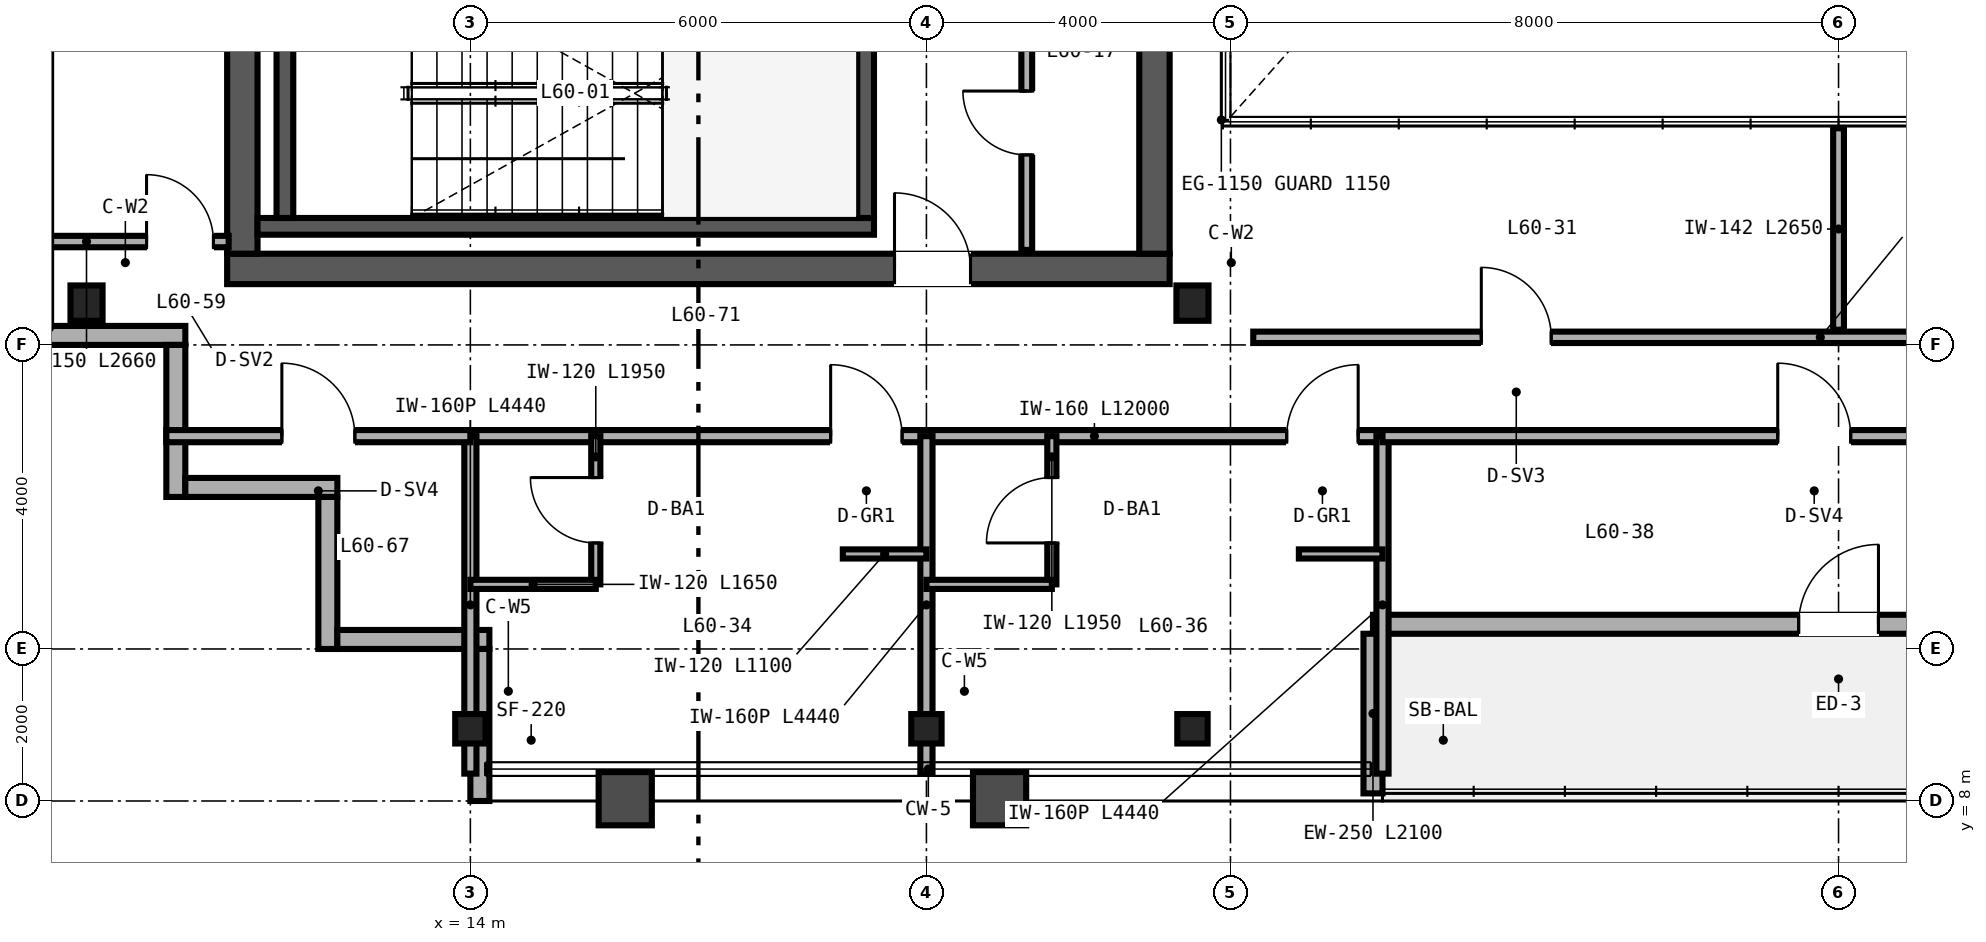
"""IFC4 building model, lengths in metres.
Left out: names, types, materials, properties, quantities, classifications, styles, units other than length and angle.
Written with IfcOpenShell. Run it as: python <this file> out.ifc"""

import sys

from ifc_helpers import new_model, si_unit, direction, frame, frame_2d, origin, origin_2d, place, context, subcontext, project, spatial, rectangle, i_section, extrude, source, transform, mapped, element, fill, save


model = new_model("IFC4")
c1 = context("Model", 3, precision=1e-05, world=origin(), true_north=direction((0.0, 1.0)))
c2 = subcontext(c1, "Body", "Model", "MODEL_VIEW")
j1 = project(units=[si_unit("LENGTHUNIT", "METRE"), si_unit("PLANEANGLEUNIT", "RADIAN")], contexts=[c1])
p1 = place(None, origin())
s1 = spatial("IfcSite", under=j1, at=p1, CompositionType="ELEMENT")
p2 = place(p1, origin())
s2 = spatial("IfcBuilding", under=s1, at=p2, CompositionType="ELEMENT")
p3 = place(p2, frame((0.0, 0.0, 240.0)))
s3 = spatial("IfcBuildingStorey", under=s2, at=p3, CompositionType="ELEMENT", Elevation=240.0)
p4 = place(p3, frame((10.8, 15.0, 0.0), z_axis=(0.0, 0.0, 1.0), x_axis=(1.0, 0.0, 0.0)))
e1 = element("IfcWall", 1, at=p4, inside=s3, PredefinedType="SHEAR", context=c2, shape_type="SweptSolid", body=[
    extrude(rectangle(XDim=12.4, YDim=0.4, at=frame_2d((6.2, 0.0))), origin(), (0.0, 0.0, 1.0), 3.38),
])
p5 = place(p4, frame((8.78, 0.0, 0.0)))
e2 = element("IfcOpeningElement", 2, at=p5, cuts=e1, PredefinedType="OPENING", context=c2, shape_type="SweptSolid", body=[
    extrude(rectangle(XDim=1.0, YDim=2.15, at=frame_2d((0.5, 1.075))), frame((0.0, 0.21, 0.0), z_axis=(0.0, -1.0, 0.0), x_axis=(1.0, 0.0, 0.0)), (0.0, 0.0, 1.0), 0.42),
])
for number, where, z_axis, x_axis in (
    (3, (11.0, 15.2, 0.0), (0.0, 0.0, 1.0), (0.0, 1.0, 0.0)),
    (4, (23.0, 15.2, 0.0), (0.0, 0.0, 1.0), (0.0, 1.0, 0.0)),
):
    element("IfcWall", number, at=place(p3, frame(where, z_axis=z_axis, x_axis=x_axis)), inside=s3, PredefinedType="SHEAR", context=c2, shape_type="SweptSolid", body=[
        extrude(rectangle(XDim=21.6, YDim=0.4, at=frame_2d((10.8, 0.0))), origin(), (0.0, 0.0, 1.0), 3.38),
    ])
p6 = place(p3, frame((11.2, 15.56, 0.0), z_axis=(0.0, 0.0, 1.0), x_axis=(1.0, 0.0, 0.0)))
e5 = element("IfcWall", 5, at=p6, inside=s3, PredefinedType="SHEAR", context=c2, shape_type="SweptSolid", body=[
    extrude(rectangle(XDim=8.11, YDim=0.22, at=frame_2d((4.055, 0.0))), origin(), (0.0, 0.0, 1.0), 3.4),
])
for number, where, z_axis, x_axis in (
    (6, (11.56, 15.67, 0.0), (0.0, 0.0, 1.0), (0.0, 1.0, 0.0)),
    (7, (19.2, 15.67, 0.0), (0.0, 0.0, 1.0), (0.0, 1.0, 0.0)),
):
    element("IfcWall", number, at=place(p3, frame(where, z_axis=z_axis, x_axis=x_axis)), inside=s3, PredefinedType="SHEAR", context=c2, shape_type="SweptSolid", body=[
        extrude(rectangle(XDim=3.28, YDim=0.22, at=frame_2d((1.64, 0.0))), origin(), (0.0, 0.0, 1.0), 3.4),
    ])
m1 = source(origin(), c2, "Body", "SweptSolid", [
    extrude(i_section(OverallWidth=0.422, OverallDepth=0.465, WebThickness=0.045, FlangeThickness=0.073, FilletRadius=0.025, at=origin_2d()), origin(), (0.0, 0.0, 1.0), 3.38),
])
for number, where, z_axis, x_axis in (
    (8, (8.95, 14.55, 0.0), (0.0, 0.0, 1.0), (1.0, 0.0, 0.0)),
    (9, (23.5, 14.55, 0.0), (0.0, 0.0, 1.0), (1.0, 0.0, 0.0)),
):
    element("IfcColumn", number, at=place(p3, frame(where, z_axis=z_axis, x_axis=x_axis)), inside=s3, PredefinedType="COLUMN", context=c2, shape_type="MappedRepresentation", body=[
        mapped(m1, transform((0.0, 0.0, 0.0), scale=1.0)),
    ])
m2 = source(origin(), c2, "Body", "SweptSolid", [
    extrude(i_section(OverallWidth=0.399, OverallDepth=0.387, WebThickness=0.021, FlangeThickness=0.033, FilletRadius=0.025, at=origin_2d()), origin(), (0.0, 0.0, 1.0), 3.38),
])
for number, where, z_axis, x_axis in (
    (10, (14.0, 8.95, 0.0), (0.0, 0.0, 1.0), (1.0, 0.0, 0.0)),
    (11, (20.0, 8.95, 0.0), (0.0, 0.0, 1.0), (1.0, 0.0, 0.0)),
    (12, (23.5, 8.95, 0.0), (0.0, 0.0, 1.0), (1.0, 0.0, 0.0)),
):
    element("IfcColumn", number, at=place(p3, frame(where, z_axis=z_axis, x_axis=x_axis)), inside=s3, PredefinedType="COLUMN", context=c2, shape_type="MappedRepresentation", body=[
        mapped(m2, transform((0.0, 0.0, 0.0), scale=1.0)),
    ])
p7 = place(p3, frame((8.0, 14.125, 0.0), z_axis=(0.0, 0.0, 1.0), x_axis=(1.0, 0.0, 0.0)))
e13 = element("IfcWall", 13, at=p7, inside=s3, PredefinedType="SOLIDWALL", context=c2, shape_type="SweptSolid", body=[
    extrude(rectangle(XDim=2.25, YDim=0.25, at=frame_2d((1.125, 0.0))), origin(), (0.0, 0.0, 1.0), 3.38),
])
for number, where, z_axis, x_axis in (
    (14, (10.125, 14.0, 0.0), (0.0, 0.0, 1.0), (0.0, -1.0, 0.0)),
    (15, (10.25, 12.125, 0.0), (0.0, 0.0, 1.0), (1.0, 0.0, 0.0)),
    (16, (12.125, 12.0, 0.0), (0.0, 0.0, 1.0), (0.0, -1.0, 0.0)),
    (17, (12.25, 10.125, 0.0), (0.0, 0.0, 1.0), (1.0, 0.0, 0.0)),
):
    element("IfcWall", number, at=place(p3, frame(where, z_axis=z_axis, x_axis=x_axis)), inside=s3, PredefinedType="SOLIDWALL", context=c2, shape_type="SweptSolid", body=[
        extrude(rectangle(XDim=2.0, YDim=0.25, at=frame_2d((1.0, 0.0))), origin(), (0.0, 0.0, 1.0), 3.38),
    ])
p8 = place(p3, frame((14.125, 10.0, 0.0), z_axis=(0.0, 0.0, 1.0), x_axis=(0.0, -1.0, 0.0)))
e18 = element("IfcWall", 18, at=p8, inside=s3, PredefinedType="SOLIDWALL", context=c2, shape_type="SweptSolid", body=[
    extrude(rectangle(XDim=2.0, YDim=0.25, at=frame_2d((1.0, 0.0))), origin(), (0.0, 0.0, 1.0), 2.687),
])
p9 = place(p3, frame((25.875, 10.325, 0.0), z_axis=(0.0, 0.0, 1.0), x_axis=(1.0, 0.0, 0.0)))
e19 = element("IfcWall", 19, at=p9, inside=s3, PredefinedType="SOLIDWALL", context=c2, shape_type="SweptSolid", body=[
    extrude(rectangle(XDim=12.25, YDim=0.25, at=frame_2d((6.125, 0.0))), origin(), (0.0, 0.0, 1.0), 3.38),
])
p10 = place(p9, frame((5.6, 0.0, 0.0)))
e20 = element("IfcOpeningElement", 20, at=p10, cuts=e19, PredefinedType="OPENING", context=c2, shape_type="SweptSolid", body=[
    extrude(rectangle(XDim=1.05, YDim=2.15, at=frame_2d((0.525, 1.075))), frame((0.0, 0.135, 0.0), z_axis=(0.0, -1.0, 0.0), x_axis=(1.0, 0.0, 0.0)), (0.0, 0.0, 1.0), 0.27),
])
p11 = place(p3, frame((25.875, 8.1, 0.0), z_axis=(0.0, 0.0, 1.0), x_axis=(0.0, 1.0, 0.0)))
e21 = element("IfcWall", 21, at=p11, inside=s3, PredefinedType="SOLIDWALL", context=c2, shape_type="SweptSolid", body=[
    extrude(rectangle(XDim=2.1, YDim=0.25, at=frame_2d((1.05, 0.0))), origin(), (0.0, 0.0, 1.0), 2.453),
])
p12 = place(p3, frame((21.32, 15.25, 0.0), z_axis=(0.0, 0.0, 1.0), x_axis=(0.0, 1.0, 0.0)))
e22 = element("IfcWall", 22, at=p12, inside=s3, PredefinedType="PARTITIONING", context=c2, shape_type="SweptSolid", body=[
    extrude(rectangle(XDim=3.59, YDim=0.142, at=frame_2d((1.795, 0.0))), origin(), (0.0, 0.0, 1.0), 3.38),
])
p13 = place(p12, frame((1.25, 0.0, 0.0)))
e23 = element("IfcOpeningElement", 23, at=p13, cuts=e22, PredefinedType="OPENING", context=c2, shape_type="SweptSolid", body=[
    extrude(rectangle(XDim=0.84, YDim=2.1, at=frame_2d((0.42, 1.05))), frame((0.0, 0.081, 0.0), z_axis=(0.0, -1.0, 0.0), x_axis=(1.0, 0.0, 0.0)), (0.0, 0.0, 1.0), 0.162),
])
p14 = place(p3, frame((32.0, 14.2, 0.0), z_axis=(0.0, 0.0, 1.0), x_axis=(0.0, 1.0, 0.0)))
e24 = element("IfcWall", 24, at=p14, inside=s3, PredefinedType="PARTITIONING", context=c2, shape_type="SweptSolid", body=[
    extrude(rectangle(XDim=2.65, YDim=0.142, at=frame_2d((1.325, 0.0))), origin(), (0.0, 0.0, 1.0), 3.38),
])
p15 = place(p3, frame((24.3, 14.1, 0.0), z_axis=(0.0, 0.0, 1.0), x_axis=(1.0, 0.0, 0.0)))
e25 = element("IfcWall", 25, at=p15, inside=s3, PredefinedType="PARTITIONING", context=c2, shape_type="SweptSolid", body=[
    extrude(rectangle(XDim=15.4, YDim=0.15, at=frame_2d((7.7, 0.0))), origin(), (0.0, 0.0, 1.0), 3.38),
])
p16 = place(p15, frame((3.0, 0.0, 0.0)))
e26 = element("IfcOpeningElement", 26, at=p16, cuts=e25, PredefinedType="OPENING", context=c2, shape_type="SweptSolid", body=[
    extrude(rectangle(XDim=0.92, YDim=2.15, at=frame_2d((0.46, 1.075))), frame((0.0, 0.085, 0.0), z_axis=(0.0, -1.0, 0.0), x_axis=(1.0, 0.0, 0.0)), (0.0, 0.0, 1.0), 0.17),
])
p17 = place(p15, frame((11.0, 0.0, 0.0)))
e27 = element("IfcOpeningElement", 27, at=p17, cuts=e25, PredefinedType="OPENING", context=c2, shape_type="SweptSolid", body=[
    extrude(rectangle(XDim=0.92, YDim=2.15, at=frame_2d((0.46, 1.075))), frame((0.0, 0.085, 0.0), z_axis=(0.0, -1.0, 0.0), x_axis=(1.0, 0.0, 0.0)), (0.0, 0.0, 1.0), 0.17),
])
p18 = place(p3, frame((14.0, 12.8, 0.0), z_axis=(0.0, 0.0, 1.0), x_axis=(1.0, 0.0, 0.0)))
e28 = element("IfcWall", 28, at=p18, inside=s3, PredefinedType="PARTITIONING", context=c2, shape_type="SweptSolid", body=[
    extrude(rectangle(XDim=12.0, YDim=0.16, at=frame_2d((6.0, 0.0))), origin(), (0.0, 0.0, 1.0), 2.923),
])
p19 = place(p18, frame((4.74, 0.0, 0.0)))
e29 = element("IfcOpeningElement", 29, at=p19, cuts=e28, PredefinedType="OPENING", context=c2, shape_type="SweptSolid", body=[
    extrude(rectangle(XDim=0.94, YDim=2.15, at=frame_2d((0.47, 1.075))), frame((0.0, 0.09, 0.0), z_axis=(0.0, -1.0, 0.0), x_axis=(1.0, 0.0, 0.0)), (0.0, 0.0, 1.0), 0.18),
])
p20 = place(p18, frame((10.74, 0.0, 0.0)))
e30 = element("IfcOpeningElement", 30, at=p20, cuts=e28, PredefinedType="OPENING", context=c2, shape_type="SweptSolid", body=[
    extrude(rectangle(XDim=0.94, YDim=2.15, at=frame_2d((0.47, 1.075))), frame((0.0, 0.09, 0.0), z_axis=(0.0, -1.0, 0.0), x_axis=(1.0, 0.0, 0.0)), (0.0, 0.0, 1.0), 0.18),
])
p21 = place(p3, frame((14.0, 8.36, 0.0), z_axis=(0.0, 0.0, 1.0), x_axis=(0.0, 1.0, 0.0)))
e31 = element("IfcWall", 31, at=p21, inside=s3, PredefinedType="PARTITIONING", context=c2, shape_type="SweptSolid", body=[
    extrude(rectangle(XDim=4.44, YDim=0.16, at=frame_2d((2.22, 0.0))), origin(), (0.0, 0.0, 1.0), 2.687),
])
p22 = place(p3, frame((26.0, 8.36, 0.0), z_axis=(0.0, 0.0, 1.0), x_axis=(0.0, 1.0, 0.0)))
e32 = element("IfcWall", 32, at=p22, inside=s3, PredefinedType="PARTITIONING", context=c2, shape_type="SweptSolid", body=[
    extrude(rectangle(XDim=4.44, YDim=0.16, at=frame_2d((2.22, 0.0))), origin(), (0.0, 0.0, 1.0), 2.453),
])
p23 = place(p3, frame((20.0, 8.36, 0.0), z_axis=(0.0, 0.0, 1.0), x_axis=(0.0, 1.0, 0.0)))
e33 = element("IfcWall", 33, at=p23, inside=s3, PredefinedType="PARTITIONING", context=c2, shape_type="SweptSolid", body=[
    extrude(rectangle(XDim=4.44, YDim=0.16, at=frame_2d((2.22, 0.0))), origin(), (0.0, 0.0, 1.0), 2.687),
])
p24 = place(p3, frame((15.65, 10.85, 0.0), z_axis=(0.0, 0.0, 1.0), x_axis=(0.0, 1.0, 0.0)))
e34 = element("IfcWall", 34, at=p24, inside=s3, PredefinedType="PARTITIONING", context=c2, shape_type="SweptSolid", body=[
    extrude(rectangle(XDim=1.95, YDim=0.12, at=frame_2d((0.975, 0.0))), origin(), (0.0, 0.0, 1.0), 3.38),
])
p25 = place(p24, frame((0.545, 0.0, 0.0)))
e35 = element("IfcOpeningElement", 35, at=p25, cuts=e34, PredefinedType="OPENING", context=c2, shape_type="SweptSolid", body=[
    extrude(rectangle(XDim=0.86, YDim=2.1, at=frame_2d((0.43, 1.05))), frame((0.0, 0.07, 0.0), z_axis=(0.0, -1.0, 0.0), x_axis=(1.0, 0.0, 0.0)), (0.0, 0.0, 1.0), 0.14),
])
p26 = place(p3, frame((14.0, 10.85, 0.0), z_axis=(0.0, 0.0, 1.0), x_axis=(1.0, 0.0, 0.0)))
e36 = element("IfcWall", 36, at=p26, inside=s3, PredefinedType="PARTITIONING", context=c2, shape_type="SweptSolid", body=[
    extrude(rectangle(XDim=1.65, YDim=0.12, at=frame_2d((0.825, 0.0))), origin(), (0.0, 0.0, 1.0), 3.38),
])
p27 = place(p3, frame((18.9, 11.25, 0.0), z_axis=(0.0, 0.0, 1.0), x_axis=(1.0, 0.0, 0.0)))
e37 = element("IfcWall", 37, at=p27, inside=s3, PredefinedType="PARTITIONING", context=c2, shape_type="SweptSolid", body=[
    extrude(rectangle(XDim=1.1, YDim=0.12, at=frame_2d((0.55, 0.0))), origin(), (0.0, 0.0, 1.0), 3.38),
])
p28 = place(p3, frame((21.65, 10.85, 0.0), z_axis=(0.0, 0.0, 1.0), x_axis=(0.0, 1.0, 0.0)))
e38 = element("IfcWall", 38, at=p28, inside=s3, PredefinedType="PARTITIONING", context=c2, shape_type="SweptSolid", body=[
    extrude(rectangle(XDim=1.95, YDim=0.12, at=frame_2d((0.975, 0.0))), origin(), (0.0, 0.0, 1.0), 3.38),
])
p29 = place(p28, frame((0.545, 0.0, 0.0)))
e39 = element("IfcOpeningElement", 39, at=p29, cuts=e38, PredefinedType="OPENING", context=c2, shape_type="SweptSolid", body=[
    extrude(rectangle(XDim=0.86, YDim=2.1, at=frame_2d((0.43, 1.05))), frame((0.0, 0.07, 0.0), z_axis=(0.0, -1.0, 0.0), x_axis=(1.0, 0.0, 0.0)), (0.0, 0.0, 1.0), 0.14),
])
p30 = place(p3, frame((20.0, 10.85, 0.0), z_axis=(0.0, 0.0, 1.0), x_axis=(1.0, 0.0, 0.0)))
e40 = element("IfcWall", 40, at=p30, inside=s3, PredefinedType="PARTITIONING", context=c2, shape_type="SweptSolid", body=[
    extrude(rectangle(XDim=1.65, YDim=0.12, at=frame_2d((0.825, 0.0))), origin(), (0.0, 0.0, 1.0), 3.38),
])
p31 = place(p3, frame((24.9, 11.25, 0.0), z_axis=(0.0, 0.0, 1.0), x_axis=(1.0, 0.0, 0.0)))
e41 = element("IfcWall", 41, at=p31, inside=s3, PredefinedType="PARTITIONING", context=c2, shape_type="SweptSolid", body=[
    extrude(rectangle(XDim=1.1, YDim=0.12, at=frame_2d((0.55, 0.0))), origin(), (0.0, 0.0, 1.0), 3.38),
])
p32 = place(p3, frame((26.0, 12.8, 0.0), z_axis=(0.0, 0.0, 1.0), x_axis=(1.0, 0.0, 0.0)))
e42 = element("IfcWall", 42, at=p32, inside=s3, PredefinedType="PARTITIONING", context=c2, shape_type="SweptSolid", body=[
    extrude(rectangle(XDim=12.0, YDim=0.16, at=frame_2d((6.0, 0.0))), origin(), (0.0, 0.0, 1.0), 3.38),
])
p33 = place(p32, frame((5.2, 0.0, 0.0)))
e43 = element("IfcOpeningElement", 43, at=p33, cuts=e42, PredefinedType="OPENING", context=c2, shape_type="SweptSolid", body=[
    extrude(rectangle(XDim=0.96, YDim=2.15, at=frame_2d((0.48, 1.075))), frame((0.0, 0.09, 0.0), z_axis=(0.0, -1.0, 0.0), x_axis=(1.0, 0.0, 0.0)), (0.0, 0.0, 1.0), 0.18),
])
p34 = place(p3, frame((8.16, 15.36, 0.0), z_axis=(0.0, 0.0, 1.0), x_axis=(1.0, 0.0, 0.0)))
e44 = element("IfcWall", 44, at=p34, inside=s3, PredefinedType="PARTITIONING", context=c2, shape_type="SweptSolid", body=[
    extrude(rectangle(XDim=2.66, YDim=0.15, at=frame_2d((1.33, 0.0))), origin(), (0.0, 0.0, 1.0), 2.601),
])
p35 = place(p34, frame((1.58, 0.0, 0.0)))
e45 = element("IfcOpeningElement", 45, at=p35, cuts=e44, PredefinedType="OPENING", context=c2, shape_type="SweptSolid", body=[
    extrude(rectangle(XDim=0.88, YDim=2.15, at=frame_2d((0.44, 1.075))), frame((0.0, 0.085, 0.0), z_axis=(0.0, -1.0, 0.0), x_axis=(1.0, 0.0, 0.0)), (0.0, 0.0, 1.0), 0.17),
])
p36 = place(p3, frame((10.0, 12.8, 0.0), z_axis=(0.0, 0.0, 1.0), x_axis=(1.0, 0.0, 0.0)))
e46 = element("IfcWall", 46, at=p36, inside=s3, PredefinedType="PARTITIONING", context=c2, shape_type="SweptSolid", body=[
    extrude(rectangle(XDim=4.0, YDim=0.16, at=frame_2d((2.0, 0.0))), origin(), (0.0, 0.0, 1.0), 3.38),
])
p37 = place(p36, frame((1.52, 0.0, 0.0)))
e47 = element("IfcOpeningElement", 47, at=p37, cuts=e46, PredefinedType="OPENING", context=c2, shape_type="SweptSolid", body=[
    extrude(rectangle(XDim=0.96, YDim=2.15, at=frame_2d((0.48, 1.075))), frame((0.0, 0.09, 0.0), z_axis=(0.0, -1.0, 0.0), x_axis=(1.0, 0.0, 0.0)), (0.0, 0.0, 1.0), 0.18),
])
m3 = source(origin(), c2, "Body", "SweptSolid", [
    extrude(rectangle(XDim=1.05, YDim=2.15, at=frame_2d((0.525, 1.075))), frame((0.0, 0.025, 0.0), z_axis=(0.0, -1.0, 0.0), x_axis=(1.0, 0.0, 0.0)), (0.0, 0.0, 1.0), 0.05),
])
p38 = place(p10, origin())
e48 = element("IfcDoor", 48, at=p38, inside=s3, OperationType="SINGLE_SWING_RIGHT", PredefinedType="DOOR", context=c2, shape_type="MappedRepresentation", body=[
    mapped(m3, transform((0.0, 0.0, 0.0), scale=1.0)),
])
fill(e20, e48)
m4 = source(origin(), c2, "Body", "SweptSolid", [
    extrude(rectangle(XDim=0.84, YDim=2.1, at=frame_2d((0.42, 1.05))), frame((0.0, 0.025, 0.0), z_axis=(0.0, -1.0, 0.0), x_axis=(1.0, 0.0, 0.0)), (0.0, 0.0, 1.0), 0.05),
])
p39 = place(p13, origin())
e49 = element("IfcDoor", 49, at=p39, inside=s3, OperationType="SINGLE_SWING_RIGHT", PredefinedType="DOOR", context=c2, shape_type="MappedRepresentation", body=[
    mapped(m4, transform((0.0, 0.0, 0.0), scale=1.0)),
])
fill(e23, e49)
m5 = source(origin(), c2, "Body", "SweptSolid", [
    extrude(rectangle(XDim=1.0, YDim=2.15, at=frame_2d((0.5, 1.075))), frame((0.0, 0.025, 0.0), z_axis=(0.0, -1.0, 0.0), x_axis=(1.0, 0.0, 0.0)), (0.0, 0.0, 1.0), 0.05),
])
p40 = place(p5, origin())
e50 = element("IfcDoor", 50, at=p40, inside=s3, OperationType="SINGLE_SWING_LEFT", PredefinedType="DOOR", context=c2, shape_type="MappedRepresentation", body=[
    mapped(m5, transform((0.0, 0.0, 0.0), scale=1.0)),
])
fill(e2, e50)
m6 = source(origin(), c2, "Body", "SweptSolid", [
    extrude(rectangle(XDim=0.92, YDim=2.15, at=frame_2d((0.46, 1.075))), frame((0.0, 0.025, 0.0), z_axis=(0.0, -1.0, 0.0), x_axis=(1.0, 0.0, 0.0)), (0.0, 0.0, 1.0), 0.05),
])
p41 = place(p16, origin())
e51 = element("IfcDoor", 51, at=p41, inside=s3, OperationType="SINGLE_SWING_LEFT", PredefinedType="DOOR", context=c2, shape_type="MappedRepresentation", body=[
    mapped(m6, transform((0.0, 0.0, 0.0), scale=1.0)),
])
fill(e26, e51)
m7 = source(origin(), c2, "Body", "SweptSolid", [
    extrude(rectangle(XDim=0.86, YDim=2.1, at=frame_2d((0.43, 1.05))), frame((0.0, 0.025, 0.0), z_axis=(0.0, -1.0, 0.0), x_axis=(1.0, 0.0, 0.0)), (0.0, 0.0, 1.0), 0.05),
])
p42 = place(p25, origin())
e52 = element("IfcDoor", 52, at=p42, inside=s3, OperationType="SINGLE_SWING_RIGHT", PredefinedType="DOOR", context=c2, shape_type="MappedRepresentation", body=[
    mapped(m7, transform((0.0, 0.0, 0.0), scale=1.0)),
])
fill(e35, e52)
p43 = place(p29, origin())
e53 = element("IfcDoor", 53, at=p43, inside=s3, OperationType="SINGLE_SWING_LEFT", PredefinedType="DOOR", context=c2, shape_type="MappedRepresentation", body=[
    mapped(m7, transform((0.0, 0.0, 0.0), scale=1.0)),
])
fill(e39, e53)
m8 = source(origin(), c2, "Body", "SweptSolid", [
    extrude(rectangle(XDim=0.94, YDim=2.15, at=frame_2d((0.47, 1.075))), frame((0.0, 0.025, 0.0), z_axis=(0.0, -1.0, 0.0), x_axis=(1.0, 0.0, 0.0)), (0.0, 0.0, 1.0), 0.05),
])
p44 = place(p19, origin())
e54 = element("IfcDoor", 54, at=p44, inside=s3, OperationType="SINGLE_SWING_LEFT", PredefinedType="DOOR", context=c2, shape_type="MappedRepresentation", body=[
    mapped(m8, transform((0.0, 0.0, 0.0), scale=1.0)),
])
fill(e29, e54)
p45 = place(p20, origin())
e55 = element("IfcDoor", 55, at=p45, inside=s3, OperationType="SINGLE_SWING_RIGHT", PredefinedType="DOOR", context=c2, shape_type="MappedRepresentation", body=[
    mapped(m8, transform((0.0, 0.0, 0.0), scale=1.0)),
])
fill(e30, e55)
m9 = source(origin(), c2, "Body", "SweptSolid", [
    extrude(rectangle(XDim=0.96, YDim=2.15, at=frame_2d((0.48, 1.075))), frame((0.0, 0.025, 0.0), z_axis=(0.0, -1.0, 0.0), x_axis=(1.0, 0.0, 0.0)), (0.0, 0.0, 1.0), 0.05),
])
p46 = place(p33, origin())
e56 = element("IfcDoor", 56, at=p46, inside=s3, OperationType="SINGLE_SWING_LEFT", PredefinedType="DOOR", context=c2, shape_type="MappedRepresentation", body=[
    mapped(m9, transform((0.0, 0.0, 0.0), scale=1.0)),
])
fill(e43, e56)
m10 = source(origin(), c2, "Body", "SweptSolid", [
    extrude(rectangle(XDim=0.88, YDim=2.15, at=frame_2d((0.44, 1.075))), frame((0.0, 0.025, 0.0), z_axis=(0.0, -1.0, 0.0), x_axis=(1.0, 0.0, 0.0)), (0.0, 0.0, 1.0), 0.05),
])
p47 = place(p35, origin())
e57 = element("IfcDoor", 57, at=p47, inside=s3, OperationType="SINGLE_SWING_LEFT", PredefinedType="DOOR", context=c2, shape_type="MappedRepresentation", body=[
    mapped(m10, transform((0.0, 0.0, 0.0), scale=1.0)),
])
fill(e45, e57)
p48 = place(p37, origin())
e58 = element("IfcDoor", 58, at=p48, inside=s3, OperationType="SINGLE_SWING_LEFT", PredefinedType="DOOR", context=c2, shape_type="MappedRepresentation", body=[
    mapped(m9, transform((0.0, 0.0, 0.0), scale=1.0)),
])
fill(e47, e58)
save(model, sys.argv[1])
